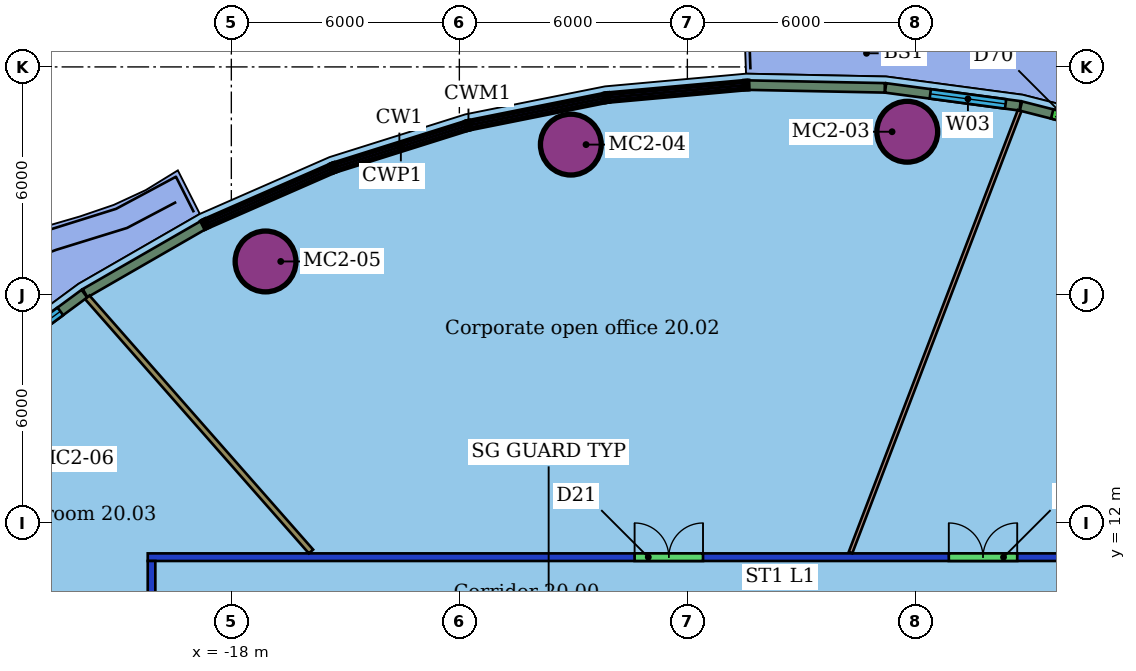
"""IFC4 building model, lengths in metres.
Left out: names, types, materials, properties, quantities, classifications, styles, units other than length and angle.
Written with IfcOpenShell. Run it as: python <this file> out.ifc"""

import sys

from ifc_helpers import new_model, si_unit, direction, frame, frame_2d, origin, origin_2d, place, context, subcontext, project, spatial, rectangle, hollow_circle, extrude, element, fill, save


model = new_model("IFC4")
c1 = context("Model", 3, precision=1e-05, world=origin(), true_north=direction((0.0, 1.0)))
c2 = subcontext(c1, "Body", "Model", "MODEL_VIEW")
j1 = project(units=[si_unit("LENGTHUNIT", "METRE"), si_unit("PLANEANGLEUNIT", "RADIAN")], contexts=[c1])
p1 = place(None, origin())
s1 = spatial("IfcSite", under=j1, at=p1, CompositionType="ELEMENT")
p2 = place(p1, origin())
s2 = spatial("IfcBuilding", under=s1, at=p2, CompositionType="ELEMENT")
p3 = place(p2, frame((0.0, 0.0, 92.2)))
s3 = spatial("IfcBuildingStorey", under=s2, at=p3, CompositionType="ELEMENT", Elevation=92.2)
for number, where, z_axis, x_axis in (
    (1, (-0.213, 22.294, 0.0), (0.0, 0.0, 1.0), (1.0, 0.0, 0.0)),
    (2, (-9.066, 21.956, 0.0), (0.0, 0.0, 1.0), (1.0, 0.0, 0.0)),
    (3, (-17.1, 18.881, 0.0), (0.0, 0.0, 1.0), (1.0, 0.0, 0.0)),
):
    element("IfcColumn", number, at=place(p3, frame(where, z_axis=z_axis, x_axis=x_axis)), inside=s3, PredefinedType="COLUMN", context=c2, shape_type="SweptSolid", body=[
        extrude(hollow_circle(Radius=0.8, WallThickness=0.055, at=origin_2d()), origin(), (0.0, 0.0, 1.0), 3.45),
    ])
p4 = place(p3, frame((-20.1, -11.0, 0.0), z_axis=(0.0, 0.0, 1.0), x_axis=(0.0, 1.0, 0.0)))
e4 = element("IfcWall", 4, at=p4, inside=s3, PredefinedType="PARTITIONING", context=c2, shape_type="SweptSolid", body=[
    extrude(rectangle(XDim=22.0, YDim=0.2, at=frame_2d((11.0, 0.0))), origin(), (0.0, 0.0, 1.0), 3.0),
])
p5 = place(p4, frame((18.842, 0.0, 0.0)))
e5 = element("IfcOpeningElement", 5, at=p5, cuts=e4, PredefinedType="OPENING", context=c2, shape_type="SweptSolid", body=[
    extrude(rectangle(XDim=0.9, YDim=2.1, at=frame_2d((0.45, 1.05))), frame((0.0, 0.11, 0.0), z_axis=(0.0, -1.0, 0.0), x_axis=(1.0, 0.0, 0.0)), (0.0, 0.0, 1.0), 0.22),
])
p6 = place(p4, frame((14.625, 0.0, 0.0)))
e6 = element("IfcOpeningElement", 6, at=p6, cuts=e4, PredefinedType="OPENING", context=c2, shape_type="SweptSolid", body=[
    extrude(rectangle(XDim=0.9, YDim=2.1, at=frame_2d((0.45, 1.05))), frame((0.0, 0.11, 0.0), z_axis=(0.0, -1.0, 0.0), x_axis=(1.0, 0.0, 0.0)), (0.0, 0.0, 1.0), 0.22),
])
p7 = place(p4, frame((7.921, 0.0, 0.0)))
e7 = element("IfcOpeningElement", 7, at=p7, cuts=e4, PredefinedType="OPENING", context=c2, shape_type="SweptSolid", body=[
    extrude(rectangle(XDim=1.8, YDim=2.4, at=frame_2d((0.9, 1.2))), frame((0.0, 0.11, 0.0), z_axis=(0.0, -1.0, 0.0), x_axis=(1.0, 0.0, 0.0)), (0.0, 0.0, 1.0), 0.22),
])
p8 = place(p3, frame((-20.2, 11.1, 0.0), z_axis=(0.0, 0.0, 1.0), x_axis=(1.0, 0.0, 0.0)))
e8 = element("IfcWall", 8, at=p8, inside=s3, PredefinedType="PARTITIONING", context=c2, shape_type="SweptSolid", body=[
    extrude(rectangle(XDim=28.4, YDim=0.2, at=frame_2d((14.2, 0.0))), origin(), (0.0, 0.0, 1.0), 3.0),
])
p9 = place(p8, frame((21.08, 0.0, 0.0)))
e9 = element("IfcOpeningElement", 9, at=p9, cuts=e8, PredefinedType="OPENING", context=c2, shape_type="SweptSolid", body=[
    extrude(rectangle(XDim=1.8, YDim=2.1, at=frame_2d((0.9, 1.05))), frame((0.0, 0.11, 0.0), z_axis=(0.0, -1.0, 0.0), x_axis=(1.0, 0.0, 0.0)), (0.0, 0.0, 1.0), 0.22),
])
p10 = place(p8, frame((12.812, 0.0, 0.0)))
e10 = element("IfcOpeningElement", 10, at=p10, cuts=e8, PredefinedType="OPENING", context=c2, shape_type="SweptSolid", body=[
    extrude(rectangle(XDim=1.8, YDim=2.1, at=frame_2d((0.9, 1.05))), frame((0.0, 0.11, 0.0), z_axis=(0.0, -1.0, 0.0), x_axis=(1.0, 0.0, 0.0)), (0.0, 0.0, 1.0), 0.22),
])
p11 = place(p3, frame((2.743, 22.851, 0.0), z_axis=(0.0, 0.0, 1.0), x_axis=(-0.357347196161, -0.933971617018, 0.0)))
e11 = element("IfcWall", 11, at=p11, inside=s3, PredefinedType="PARTITIONING", context=c2, shape_type="SweptSolid", body=[
    extrude(rectangle(XDim=12.456, YDim=0.1, at=frame_2d((6.228, 0.0))), origin(), (0.0, 0.0, 1.0), 3.45),
])
p12 = place(p3, frame((-21.79, 17.936, 0.0), z_axis=(0.0, 0.0, 1.0), x_axis=(0.660761943982, -0.750595532484, 0.0)))
e12 = element("IfcWall", 12, at=p12, inside=s3, PredefinedType="PARTITIONING", context=c2, shape_type="SweptSolid", body=[
    extrude(rectangle(XDim=8.909, YDim=0.15, at=frame_2d((4.454, 0.0))), origin(), (0.0, 0.0, 1.0), 3.45),
])
p13 = place(p3, frame((-29.421, 10.796, 0.0), z_axis=(0.0, 0.0, 1.0), x_axis=(0.908154893972, -0.418634313637, 0.0)))
e13 = element("IfcWall", 13, at=p13, inside=s3, PredefinedType="PARTITIONING", context=c2, shape_type="SweptSolid", body=[
    extrude(rectangle(XDim=10.119, YDim=0.15, at=frame_2d((5.06, 0.0))), origin(), (0.0, 0.0, 1.0), 3.45),
])
p14 = place(p3, frame((6.165, 22.107, 0.0), z_axis=(0.0, 0.0, 1.0), x_axis=(-0.969010602055, 0.247019135097, 0.0)))
e14 = element("IfcWall", 14, at=p14, inside=s3, PredefinedType="SOLIDWALL", context=c2, shape_type="SweptSolid", body=[
    extrude(rectangle(XDim=3.496, YDim=0.25, at=frame_2d((1.748, 0.0))), origin(), (0.0, 0.0, 1.0), 3.05),
])
p15 = place(p14, frame((0.848, 0.0, 0.0)))
e15 = element("IfcOpeningElement", 15, at=p15, cuts=e14, PredefinedType="OPENING", context=c2, shape_type="SweptSolid", body=[
    extrude(rectangle(XDim=1.8, YDim=2.4, at=frame_2d((0.9, 1.2))), frame((0.0, 0.135, 0.0), z_axis=(0.0, -1.0, 0.0), x_axis=(1.0, 0.0, 0.0)), (0.0, 0.0, 1.0), 0.27),
])
p16 = place(p3, frame((2.755, 22.975, 0.0), z_axis=(0.0, 0.0, 1.0), x_axis=(-0.991208182453, 0.132311522699, 0.0)))
e16 = element("IfcWall", 16, at=p16, inside=s3, PredefinedType="SOLIDWALL", context=c2, shape_type="SweptSolid", body=[
    extrude(rectangle(XDim=3.571, YDim=0.25, at=frame_2d((1.785, 0.0))), origin(), (0.0, 0.0, 1.0), 3.05),
])
p17 = place(p16, frame((0.385, 0.0, 0.9)))
e17 = element("IfcOpeningElement", 17, at=p17, cuts=e16, PredefinedType="OPENING", context=c2, shape_type="SweptSolid", body=[
    extrude(rectangle(XDim=2.0, YDim=2.1, at=frame_2d((1.0, 1.05))), frame((0.0, 0.135, 0.0), z_axis=(0.0, -1.0, 0.0), x_axis=(1.0, 0.0, 0.0)), (0.0, 0.0, 1.0), 0.27),
])
p18 = place(p3, frame((-0.806, 23.449, 0.0), z_axis=(0.0, 0.0, 1.0), x_axis=(-0.999799651437, 0.020016417945, 0.0)))
e18 = element("IfcWall", 18, at=p18, inside=s3, PredefinedType="SOLIDWALL", context=c2, shape_type="SweptSolid", body=[
    extrude(rectangle(XDim=3.586, YDim=0.25, at=frame_2d((1.793, 0.0))), origin(), (0.0, 0.0, 1.0), 3.05),
])
p19 = place(p3, frame((-18.741, 19.836, 0.0), z_axis=(0.0, 0.0, 1.0), x_axis=(-0.866511818646, -0.49915655675, 0.0)))
e19 = element("IfcWall", 19, at=p19, inside=s3, PredefinedType="SOLIDWALL", context=c2, shape_type="SweptSolid", body=[
    extrude(rectangle(XDim=3.586, YDim=0.25, at=frame_2d((1.793, 0.0))), origin(), (0.0, 0.0, 1.0), 3.05),
])
p20 = place(p3, frame((-21.867, 18.034, 0.0), z_axis=(0.0, 0.0, 1.0), x_axis=(-0.804847820355, -0.593481243234, 0.0)))
e20 = element("IfcWall", 20, at=p20, inside=s3, PredefinedType="SOLIDWALL", context=c2, shape_type="SweptSolid", body=[
    extrude(rectangle(XDim=3.57, YDim=0.25, at=frame_2d((1.785, 0.0))), origin(), (0.0, 0.0, 1.0), 3.05),
])
p21 = place(p20, frame((0.785, 0.0, 0.9)))
e21 = element("IfcOpeningElement", 21, at=p21, cuts=e20, PredefinedType="OPENING", context=c2, shape_type="SweptSolid", body=[
    extrude(rectangle(XDim=2.0, YDim=2.1, at=frame_2d((1.0, 1.05))), frame((0.0, 0.135, 0.0), z_axis=(0.0, -1.0, 0.0), x_axis=(1.0, 0.0, 0.0)), (0.0, 0.0, 1.0), 0.27),
])
p22 = place(p9, origin())
e22 = element("IfcDoor", 22, at=p22, inside=s3, OperationType="DOUBLE_DOOR_SINGLE_SWING", PredefinedType="DOOR", context=c2, shape_type="SweptSolid", body=[
    extrude(rectangle(XDim=1.8, YDim=2.1, at=frame_2d((0.9, 1.05))), frame((0.0, 0.025, 0.0), z_axis=(0.0, -1.0, 0.0), x_axis=(1.0, 0.0, 0.0)), (0.0, 0.0, 1.0), 0.05),
])
fill(e9, e22)
p23 = place(p10, origin())
e23 = element("IfcDoor", 23, at=p23, inside=s3, OperationType="DOUBLE_DOOR_SINGLE_SWING", PredefinedType="DOOR", context=c2, shape_type="SweptSolid", body=[
    extrude(rectangle(XDim=1.8, YDim=2.1, at=frame_2d((0.9, 1.05))), frame((0.0, 0.025, 0.0), z_axis=(0.0, -1.0, 0.0), x_axis=(1.0, 0.0, 0.0)), (0.0, 0.0, 1.0), 0.05),
])
fill(e10, e23)
p24 = place(p15, origin())
e24 = element("IfcDoor", 24, at=p24, inside=s3, OperationType="DOUBLE_DOOR_SLIDING", PredefinedType="DOOR", context=c2, shape_type="SweptSolid", body=[
    extrude(rectangle(XDim=1.8, YDim=2.4, at=frame_2d((0.9, 1.2))), frame((0.0, 0.025, 0.0), z_axis=(0.0, -1.0, 0.0), x_axis=(1.0, 0.0, 0.0)), (0.0, 0.0, 1.0), 0.05),
])
fill(e15, e24)
p25 = place(p17, origin())
e25 = element("IfcWindow", 25, at=p25, inside=s3, PartitioningType="SINGLE_PANEL", PredefinedType="WINDOW", context=c2, shape_type="SweptSolid", body=[
    extrude(rectangle(XDim=2.0, YDim=2.1, at=frame_2d((1.0, 1.05))), frame((0.0, 0.03, 0.0), z_axis=(0.0, -1.0, 0.0), x_axis=(1.0, 0.0, 0.0)), (0.0, 0.0, 1.0), 0.06),
])
fill(e17, e25)
p26 = place(p21, origin())
e26 = element("IfcWindow", 26, at=p26, inside=s3, PartitioningType="SINGLE_PANEL", PredefinedType="WINDOW", context=c2, shape_type="SweptSolid", body=[
    extrude(rectangle(XDim=2.0, YDim=2.1, at=frame_2d((1.0, 1.05))), frame((0.0, 0.03, 0.0), z_axis=(0.0, -1.0, 0.0), x_axis=(1.0, 0.0, 0.0)), (0.0, 0.0, 1.0), 0.06),
])
fill(e21, e26)
save(model, sys.argv[1])
